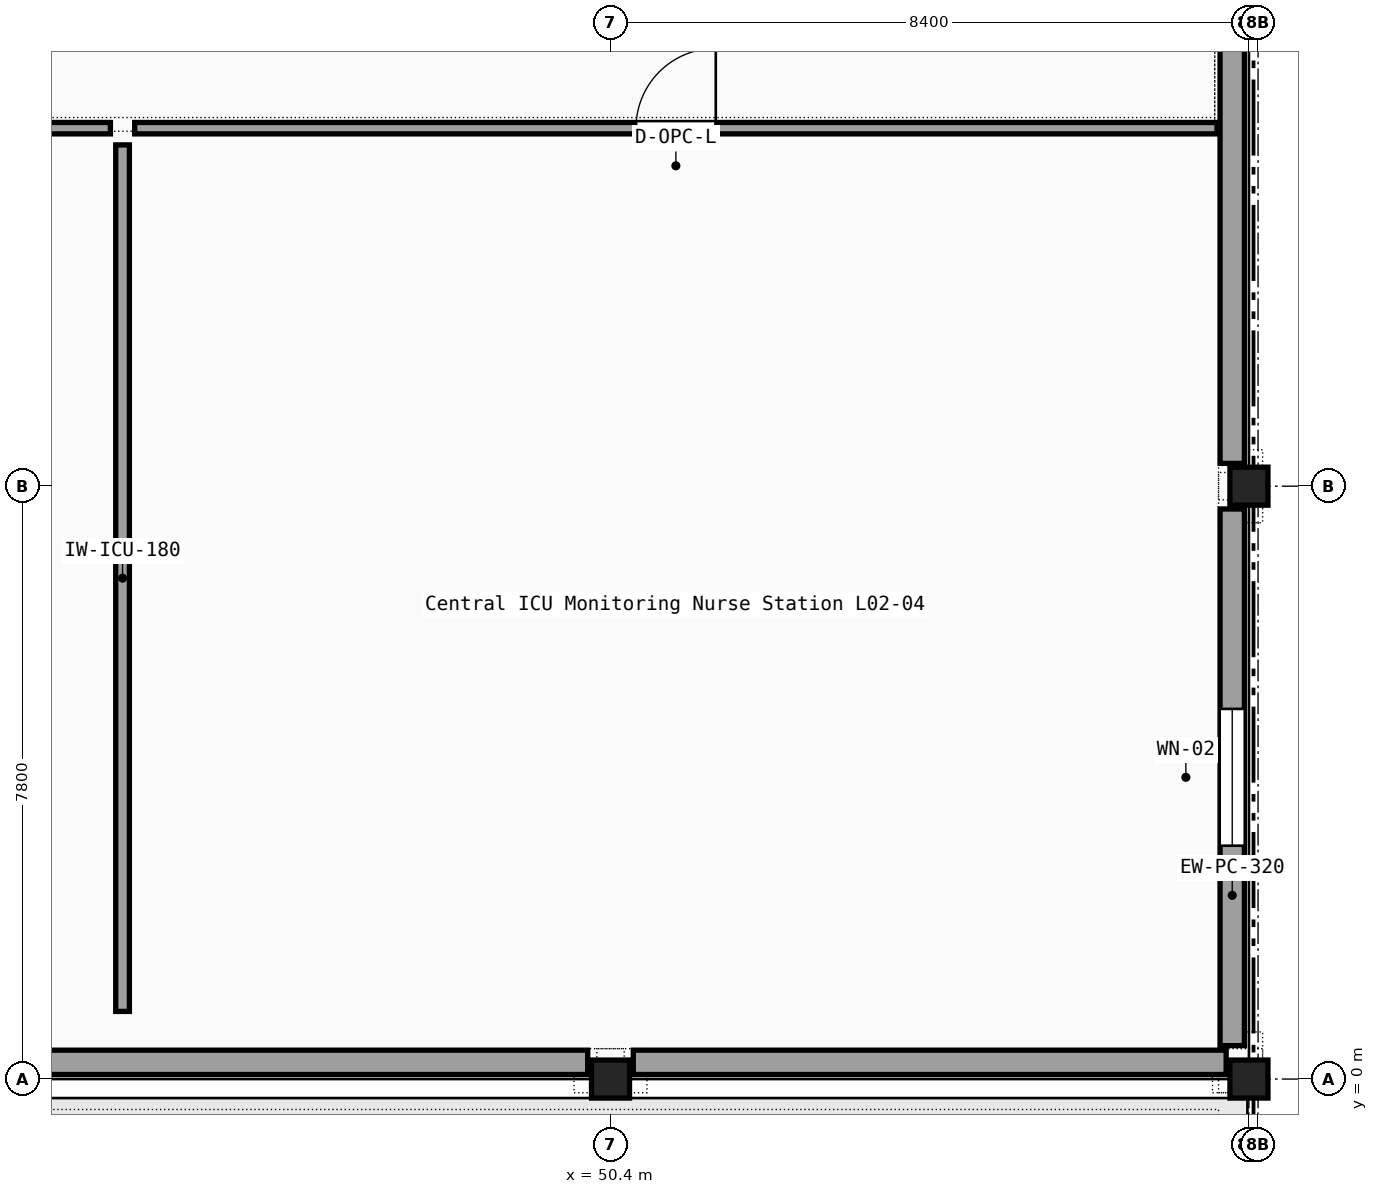
"""IFC4 building model, lengths in metres.
Left out: names, types, materials, properties, quantities, classifications, styles, units other than length and angle.
Written with IfcOpenShell. Run it as: python <this file> out.ifc"""

import sys

from ifc_helpers import new_model, si_unit, direction, frame, frame_2d, origin, origin_2d, place, context, subcontext, project, spatial, rectangle, extrude, element, fill, save


model = new_model("IFC4")
c1 = context("Model", 3, precision=1e-05, world=origin(), true_north=direction((0.0, 1.0)))
c2 = subcontext(c1, "Body", "Model", "MODEL_VIEW")
j1 = project(units=[si_unit("LENGTHUNIT", "METRE"), si_unit("PLANEANGLEUNIT", "RADIAN")], contexts=[c1])
p1 = place(None, origin())
s1 = spatial("IfcSite", under=j1, at=p1, CompositionType="ELEMENT")
p2 = place(p1, origin())
s2 = spatial("IfcBuilding", under=s1, at=p2, CompositionType="ELEMENT")
p3 = place(p2, frame((0.0, 0.0, 10.2)))
s3 = spatial("IfcBuildingStorey", under=s2, at=p3, CompositionType="ELEMENT", Elevation=10.2)
for number, where, z_axis, x_axis in (
    (1, (50.4, 0.0, 0.0), (0.0, 0.0, 1.0), (1.0, 0.0, 0.0)),
    (2, (58.8, 0.0, 0.0), (0.0, 0.0, 1.0), (1.0, 0.0, 0.0)),
    (3, (58.8, 7.8, 0.0), (0.0, 0.0, 1.0), (1.0, 0.0, 0.0)),
):
    element("IfcColumn", number, at=place(p3, frame(where, z_axis=z_axis, x_axis=x_axis)), inside=s3, PredefinedType="COLUMN", context=c2, shape_type="SweptSolid", body=[
        extrude(rectangle(XDim=0.5, YDim=0.5, at=origin_2d()), origin(), (0.0, 0.0, 1.0), 4.65),
    ])
for number, where, z_axis, x_axis in (
    (4, (42.3, 0.22, 0.0), (0.0, 0.0, 1.0), (1.0, 0.0, 0.0)),
    (5, (50.7, 0.22, 0.0), (0.0, 0.0, 1.0), (1.0, 0.0, 0.0)),
):
    element("IfcWall", number, at=place(p3, frame(where, z_axis=z_axis, x_axis=x_axis)), inside=s3, PredefinedType="SOLIDWALL", context=c2, shape_type="SweptSolid", body=[
        extrude(rectangle(XDim=7.8, YDim=0.32, at=frame_2d((3.9, 0.0))), origin(), (0.0, 0.0, 1.0), 4.37),
    ])
p4 = place(p3, frame((58.58, 0.44, 0.0), z_axis=(0.0, 0.0, 1.0), x_axis=(0.0, 1.0, 0.0)))
e6 = element("IfcWall", 6, at=p4, inside=s3, PredefinedType="SOLIDWALL", context=c2, shape_type="SweptSolid", body=[
    extrude(rectangle(XDim=7.06, YDim=0.32, at=frame_2d((3.53, 0.0))), origin(), (0.0, 0.0, 1.0), 4.37),
])
p5 = place(p4, frame((2.63, 0.0, 0.9)))
e7 = element("IfcOpeningElement", 7, at=p5, cuts=e6, PredefinedType="OPENING", context=c2, shape_type="SweptSolid", body=[
    extrude(rectangle(XDim=1.8, YDim=1.6, at=frame_2d((0.9, 0.8))), frame((0.0, 0.17, 0.0), z_axis=(0.0, -1.0, 0.0), x_axis=(1.0, 0.0, 0.0)), (0.0, 0.0, 1.0), 0.34),
])
p6 = place(p3, frame((58.58, 8.1, 0.0), z_axis=(0.0, 0.0, 1.0), x_axis=(0.0, 1.0, 0.0)))
e8 = element("IfcWall", 8, at=p6, inside=s3, PredefinedType="SOLIDWALL", context=c2, shape_type="SweptSolid", body=[
    extrude(rectangle(XDim=7.06, YDim=0.32, at=frame_2d((3.53, 0.0))), origin(), (0.0, 0.0, 1.0), 4.37),
])
p7 = place(p3, frame((29.66, 12.51, 0.0), z_axis=(0.0, 0.0, 1.0), x_axis=(1.0, 0.0, 0.0)))
e9 = element("IfcWall", 9, at=p7, inside=s3, PredefinedType="PARTITIONING", context=c2, shape_type="SweptSolid", body=[
    extrude(rectangle(XDim=14.16, YDim=0.15, at=frame_2d((7.08, 0.0))), origin(), (0.0, 0.0, 1.0), 4.04),
])
p8 = place(p7, frame((6.23, 0.0, 0.0)))
e10 = element("IfcOpeningElement", 10, at=p8, cuts=e9, PredefinedType="OPENING", context=c2, shape_type="SweptSolid", body=[
    extrude(rectangle(XDim=1.7, YDim=2.3, at=frame_2d((0.85, 1.15))), frame((0.0, 0.085, 0.0), z_axis=(0.0, -1.0, 0.0), x_axis=(1.0, 0.0, 0.0)), (0.0, 0.0, 1.0), 0.17),
])
p9 = place(p3, frame((43.98, 0.89, 0.0), z_axis=(0.0, 0.0, 1.0), x_axis=(0.0, 1.0, 0.0)))
e11 = element("IfcWall", 11, at=p9, inside=s3, PredefinedType="PARTITIONING", context=c2, shape_type="SweptSolid", body=[
    extrude(rectangle(XDim=11.4, YDim=0.18, at=frame_2d((5.7, 0.0))), origin(), (0.0, 0.0, 1.0), 4.37),
])
p10 = place(p3, frame((44.14, 12.51, 0.0), z_axis=(0.0, 0.0, 1.0), x_axis=(1.0, 0.0, 0.0)))
e12 = element("IfcWall", 12, at=p10, inside=s3, PredefinedType="PARTITIONING", context=c2, shape_type="SweptSolid", body=[
    extrude(rectangle(XDim=14.24, YDim=0.15, at=frame_2d((7.12, 0.0))), origin(), (0.0, 0.0, 1.0), 4.37),
])
p11 = place(p10, frame((6.595, 0.0, 0.0)))
e13 = element("IfcOpeningElement", 13, at=p11, cuts=e12, PredefinedType="OPENING", context=c2, shape_type="SweptSolid", body=[
    extrude(rectangle(XDim=1.05, YDim=2.15, at=frame_2d((0.525, 1.075))), frame((0.0, 0.085, 0.0), z_axis=(0.0, -1.0, 0.0), x_axis=(1.0, 0.0, 0.0)), (0.0, 0.0, 1.0), 0.17),
])
p12 = place(p5, origin())
e14 = element("IfcWindow", 14, at=p12, inside=s3, PartitioningType="SINGLE_PANEL", PredefinedType="WINDOW", context=c2, shape_type="SweptSolid", body=[
    extrude(rectangle(XDim=1.8, YDim=1.6, at=frame_2d((0.9, 0.8))), frame((0.0, 0.03, 0.0), z_axis=(0.0, -1.0, 0.0), x_axis=(1.0, 0.0, 0.0)), (0.0, 0.0, 1.0), 0.06),
])
fill(e7, e14)
p13 = place(p11, origin())
e15 = element("IfcDoor", 15, at=p13, inside=s3, OperationType="SINGLE_SWING_RIGHT", PredefinedType="DOOR", context=c2, shape_type="SweptSolid", body=[
    extrude(rectangle(XDim=1.05, YDim=2.15, at=frame_2d((0.525, 1.075))), frame((0.0, 0.025, 0.0), z_axis=(0.0, -1.0, 0.0), x_axis=(1.0, 0.0, 0.0)), (0.0, 0.0, 1.0), 0.05),
])
fill(e13, e15)
save(model, sys.argv[1])
